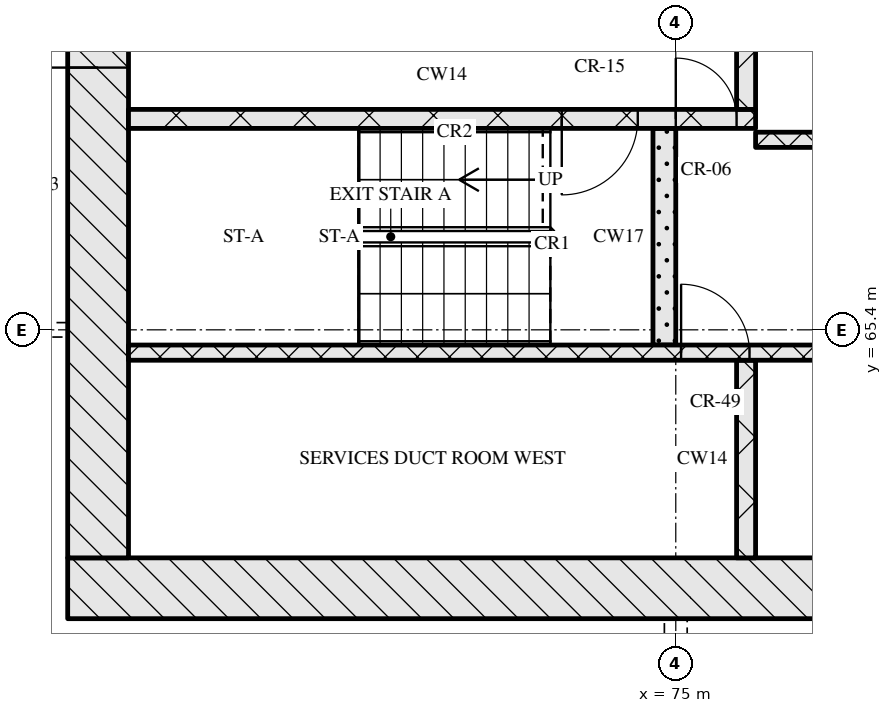
"""IFC4 building model, lengths in metres.
Left out: names, types, materials, properties, quantities, classifications, styles, units other than length and angle.
Written with IfcOpenShell. Run it as: python <this file> out.ifc"""

import sys

from ifc_helpers import new_model, si_unit, direction, frame, frame_2d, origin, place, context, subcontext, project, spatial, rectangle, extrude, element, fill, save


model = new_model("IFC4")
c1 = context("Model", 3, precision=1e-05, world=origin(), true_north=direction((0.0, 1.0)))
c2 = subcontext(c1, "Body", "Model", "MODEL_VIEW")
j1 = project(units=[si_unit("LENGTHUNIT", "METRE"), si_unit("PLANEANGLEUNIT", "RADIAN")], contexts=[c1])
p1 = place(None, origin())
s1 = spatial("IfcSite", under=j1, at=p1, CompositionType="ELEMENT")
p2 = place(p1, origin())
s2 = spatial("IfcBuilding", under=s1, at=p2, CompositionType="ELEMENT")
p3 = place(p2, frame((0.0, 0.0, 147.45)))
s3 = spatial("IfcBuildingStorey", under=s2, at=p3, CompositionType="ELEMENT", Elevation=147.45)
p4 = place(p3, frame((67.0, 62.0, 0.0), z_axis=(0.0, 0.0, 1.0), x_axis=(1.0, 0.0, 0.0)))
e1 = element("IfcWall", 1, at=p4, inside=s3, PredefinedType="SOLIDWALL", context=c2, shape_type="SweptSolid", body=[
    extrude(rectangle(XDim=41.2, YDim=0.8, at=frame_2d((20.6, 0.0))), origin(), (0.0, 0.0, 1.0), 3.32),
])
p5 = place(p4, frame((20.95, 0.0, 0.0)))
e2 = element("IfcOpeningElement", 2, at=p5, cuts=e1, PredefinedType="OPENING", context=c2, shape_type="SweptSolid", body=[
    extrude(rectangle(XDim=1.8, YDim=2.1, at=frame_2d((0.9, 1.05))), frame((0.0, 0.41, 0.0), z_axis=(0.0, -1.0, 0.0), x_axis=(1.0, 0.0, 0.0)), (0.0, 0.0, 1.0), 0.82),
])
p6 = place(p3, frame((67.4, 62.4, 0.0), z_axis=(0.0, 0.0, 1.0), x_axis=(0.0, 1.0, 0.0)))
e3 = element("IfcWall", 3, at=p6, inside=s3, PredefinedType="SOLIDWALL", context=c2, shape_type="SweptSolid", body=[
    extrude(rectangle(XDim=12.0, YDim=0.8, at=frame_2d((6.0, 0.0))), origin(), (0.0, 0.0, 1.0), 3.32),
])
p7 = place(p6, frame((6.45, 0.0, 0.0)))
e4 = element("IfcOpeningElement", 4, at=p7, cuts=e3, PredefinedType="OPENING", context=c2, shape_type="SweptSolid", body=[
    extrude(rectangle(XDim=1.2, YDim=2.1, at=frame_2d((0.6, 1.05))), frame((0.0, 0.41, 0.0), z_axis=(0.0, -1.0, 0.0), x_axis=(1.0, 0.0, 0.0)), (0.0, 0.0, 1.0), 0.82),
])
p8 = place(p3, frame((75.925, 62.4, 0.0), z_axis=(0.0, 0.0, 1.0), x_axis=(0.0, 1.0, 0.0)))
e5 = element("IfcWall", 5, at=p8, inside=s3, PredefinedType="SOLIDWALL", context=c2, shape_type="SweptSolid", body=[
    extrude(rectangle(XDim=2.6, YDim=0.25, at=frame_2d((1.3, 0.0))), origin(), (0.0, 0.0, 1.0), 3.32),
])
p9 = place(p3, frame((67.8, 65.1, 0.0), z_axis=(0.0, 0.0, 1.0), x_axis=(1.0, 0.0, 0.0)))
e6 = element("IfcWall", 6, at=p9, inside=s3, PredefinedType="SOLIDWALL", context=c2, shape_type="SweptSolid", body=[
    extrude(rectangle(XDim=18.5, YDim=0.2, at=frame_2d((9.25, 0.0))), origin(), (0.0, 0.0, 1.0), 3.32),
])
p10 = place(p9, frame((7.27, 0.0, 0.0)))
e7 = element("IfcOpeningElement", 7, at=p10, cuts=e6, PredefinedType="OPENING", context=c2, shape_type="SweptSolid", body=[
    extrude(rectangle(XDim=0.9, YDim=2.1, at=frame_2d((0.45, 1.05))), frame((0.0, 0.11, 0.0), z_axis=(0.0, -1.0, 0.0), x_axis=(1.0, 0.0, 0.0)), (0.0, 0.0, 1.0), 0.22),
])
p11 = place(p9, frame((11.45, 0.0, 0.0)))
e8 = element("IfcOpeningElement", 8, at=p11, cuts=e6, PredefinedType="OPENING", context=c2, shape_type="SweptSolid", body=[
    extrude(rectangle(XDim=0.9, YDim=2.1, at=frame_2d((0.45, 1.05))), frame((0.0, 0.11, 0.0), z_axis=(0.0, -1.0, 0.0), x_axis=(1.0, 0.0, 0.0)), (0.0, 0.0, 1.0), 0.22),
])
p12 = place(p9, frame((16.7, 0.0, 0.0)))
e9 = element("IfcOpeningElement", 9, at=p12, cuts=e6, PredefinedType="OPENING", context=c2, shape_type="SweptSolid", body=[
    extrude(rectangle(XDim=0.9, YDim=2.1, at=frame_2d((0.45, 1.05))), frame((0.0, 0.11, 0.0), z_axis=(0.0, -1.0, 0.0), x_axis=(1.0, 0.0, 0.0)), (0.0, 0.0, 1.0), 0.22),
])
p13 = place(p3, frame((74.85, 65.2, 0.0), z_axis=(0.0, 0.0, 1.0), x_axis=(0.0, 1.0, 0.0)))
e10 = element("IfcWall", 10, at=p13, inside=s3, PredefinedType="SOLIDWALL", context=c2, shape_type="SweptSolid", body=[
    extrude(rectangle(XDim=2.85, YDim=0.3, at=frame_2d((1.425, 0.0))), origin(), (0.0, 0.0, 1.0), 3.32),
])
p14 = place(p3, frame((76.05, 67.9, 0.0), z_axis=(0.0, 0.0, 1.0), x_axis=(1.0, 0.0, 0.0)))
e11 = element("IfcWall", 11, at=p14, inside=s3, PredefinedType="SOLIDWALL", context=c2, shape_type="SweptSolid", body=[
    extrude(rectangle(XDim=23.1, YDim=0.2, at=frame_2d((11.55, 0.0))), origin(), (0.0, 0.0, 1.0), 3.32),
])
p15 = place(p14, frame((1.4, 0.0, 0.0)))
e12 = element("IfcOpeningElement", 12, at=p15, cuts=e11, PredefinedType="OPENING", context=c2, shape_type="SweptSolid", body=[
    extrude(rectangle(XDim=0.9, YDim=2.1, at=frame_2d((0.45, 1.05))), frame((0.0, 0.11, 0.0), z_axis=(0.0, -1.0, 0.0), x_axis=(1.0, 0.0, 0.0)), (0.0, 0.0, 1.0), 0.22),
])
p16 = place(p14, frame((5.11, 0.0, 0.0)))
e13 = element("IfcOpeningElement", 13, at=p16, cuts=e11, PredefinedType="OPENING", context=c2, shape_type="SweptSolid", body=[
    extrude(rectangle(XDim=0.9, YDim=2.1, at=frame_2d((0.45, 1.05))), frame((0.0, 0.11, 0.0), z_axis=(0.0, -1.0, 0.0), x_axis=(1.0, 0.0, 0.0)), (0.0, 0.0, 1.0), 0.22),
])
p17 = place(p14, frame((8.45, 0.0, 0.0)))
e14 = element("IfcOpeningElement", 14, at=p17, cuts=e11, PredefinedType="OPENING", context=c2, shape_type="SweptSolid", body=[
    extrude(rectangle(XDim=0.9, YDim=2.1, at=frame_2d((0.45, 1.05))), frame((0.0, 0.11, 0.0), z_axis=(0.0, -1.0, 0.0), x_axis=(1.0, 0.0, 0.0)), (0.0, 0.0, 1.0), 0.22),
])
p18 = place(p14, frame((10.91, 0.0, 0.0)))
e15 = element("IfcOpeningElement", 15, at=p18, cuts=e11, PredefinedType="OPENING", context=c2, shape_type="SweptSolid", body=[
    extrude(rectangle(XDim=0.9, YDim=2.1, at=frame_2d((0.45, 1.05))), frame((0.0, 0.11, 0.0), z_axis=(0.0, -1.0, 0.0), x_axis=(1.0, 0.0, 0.0)), (0.0, 0.0, 1.0), 0.22),
])
p19 = place(p14, frame((13.55, 0.0, 0.0)))
e16 = element("IfcOpeningElement", 16, at=p19, cuts=e11, PredefinedType="OPENING", context=c2, shape_type="SweptSolid", body=[
    extrude(rectangle(XDim=1.0, YDim=2.1, at=frame_2d((0.5, 1.05))), frame((0.0, 0.11, 0.0), z_axis=(0.0, -1.0, 0.0), x_axis=(1.0, 0.0, 0.0)), (0.0, 0.0, 1.0), 0.22),
])
p20 = place(p14, frame((16.2, 0.0, 0.0)))
e17 = element("IfcOpeningElement", 17, at=p20, cuts=e11, PredefinedType="OPENING", context=c2, shape_type="SweptSolid", body=[
    extrude(rectangle(XDim=1.1, YDim=2.1, at=frame_2d((0.55, 1.05))), frame((0.0, 0.11, 0.0), z_axis=(0.0, -1.0, 0.0), x_axis=(1.0, 0.0, 0.0)), (0.0, 0.0, 1.0), 0.22),
])
p21 = place(p14, frame((18.7, 0.0, 0.0)))
e18 = element("IfcOpeningElement", 18, at=p21, cuts=e11, PredefinedType="OPENING", context=c2, shape_type="SweptSolid", body=[
    extrude(rectangle(XDim=1.1, YDim=2.1, at=frame_2d((0.55, 1.05))), frame((0.0, 0.11, 0.0), z_axis=(0.0, -1.0, 0.0), x_axis=(1.0, 0.0, 0.0)), (0.0, 0.0, 1.0), 0.22),
])
p22 = place(p14, frame((21.2, 0.0, 0.0)))
e19 = element("IfcOpeningElement", 19, at=p22, cuts=e11, PredefinedType="OPENING", context=c2, shape_type="SweptSolid", body=[
    extrude(rectangle(XDim=1.1, YDim=2.1, at=frame_2d((0.55, 1.05))), frame((0.0, 0.11, 0.0), z_axis=(0.0, -1.0, 0.0), x_axis=(1.0, 0.0, 0.0)), (0.0, 0.0, 1.0), 0.22),
])
p23 = place(p3, frame((67.8, 68.175, 0.0), z_axis=(0.0, 0.0, 1.0), x_axis=(1.0, 0.0, 0.0)))
e20 = element("IfcWall", 20, at=p23, inside=s3, PredefinedType="SOLIDWALL", context=c2, shape_type="SweptSolid", body=[
    extrude(rectangle(XDim=8.25, YDim=0.25, at=frame_2d((4.125, 0.0))), origin(), (0.0, 0.0, 1.0), 3.32),
])
p24 = place(p23, frame((5.7, 0.0, 0.0)))
e21 = element("IfcOpeningElement", 21, at=p24, cuts=e20, PredefinedType="OPENING", context=c2, shape_type="SweptSolid", body=[
    extrude(rectangle(XDim=1.0, YDim=2.1, at=frame_2d((0.5, 1.05))), frame((0.0, 0.135, 0.0), z_axis=(0.0, -1.0, 0.0), x_axis=(1.0, 0.0, 0.0)), (0.0, 0.0, 1.0), 0.27),
])
p25 = place(p23, frame((7.2, 0.0, 0.0)))
e22 = element("IfcOpeningElement", 22, at=p25, cuts=e20, PredefinedType="OPENING", context=c2, shape_type="SweptSolid", body=[
    extrude(rectangle(XDim=0.8, YDim=2.1, at=frame_2d((0.4, 1.05))), frame((0.0, 0.135, 0.0), z_axis=(0.0, -1.0, 0.0), x_axis=(1.0, 0.0, 0.0)), (0.0, 0.0, 1.0), 0.27),
])
p26 = place(p3, frame((75.925, 68.3, 0.0), z_axis=(0.0, 0.0, 1.0), x_axis=(0.0, 1.0, 0.0)))
e23 = element("IfcWall", 23, at=p26, inside=s3, PredefinedType="SOLIDWALL", context=c2, shape_type="SweptSolid", body=[
    extrude(rectangle(XDim=2.3, YDim=0.25, at=frame_2d((1.15, 0.0))), origin(), (0.0, 0.0, 1.0), 3.32),
])
p27 = place(p10, origin())
e24 = element("IfcDoor", 24, at=p27, inside=s3, OperationType="SINGLE_SWING_LEFT", PredefinedType="DOOR", context=c2, shape_type="SweptSolid", body=[
    extrude(rectangle(XDim=0.9, YDim=2.1, at=frame_2d((0.45, 1.05))), frame((0.0, 0.025, 0.0), z_axis=(0.0, -1.0, 0.0), x_axis=(1.0, 0.0, 0.0)), (0.0, 0.0, 1.0), 0.05),
])
fill(e7, e24)
p28 = place(p24, origin())
e25 = element("IfcDoor", 25, at=p28, inside=s3, OperationType="SINGLE_SWING_RIGHT", PredefinedType="DOOR", context=c2, shape_type="SweptSolid", body=[
    extrude(rectangle(XDim=1.0, YDim=2.1, at=frame_2d((0.5, 1.05))), frame((0.0, 0.025, 0.0), z_axis=(0.0, -1.0, 0.0), x_axis=(1.0, 0.0, 0.0)), (0.0, 0.0, 1.0), 0.05),
])
fill(e21, e25)
p29 = place(p25, origin())
e26 = element("IfcDoor", 26, at=p29, inside=s3, OperationType="SINGLE_SWING_LEFT", PredefinedType="DOOR", context=c2, shape_type="SweptSolid", body=[
    extrude(rectangle(XDim=0.8, YDim=2.1, at=frame_2d((0.4, 1.05))), frame((0.0, 0.025, 0.0), z_axis=(0.0, -1.0, 0.0), x_axis=(1.0, 0.0, 0.0)), (0.0, 0.0, 1.0), 0.05),
])
fill(e22, e26)
p30 = place(p7, origin())
e27 = element("IfcDoor", 27, at=p30, inside=s3, OperationType="SINGLE_SWING_LEFT", PredefinedType="DOOR", context=c2, shape_type="SweptSolid", body=[
    extrude(rectangle(XDim=1.2, YDim=2.1, at=frame_2d((0.6, 1.05))), frame((0.0, 0.025, 0.0), z_axis=(0.0, -1.0, 0.0), x_axis=(1.0, 0.0, 0.0)), (0.0, 0.0, 1.0), 0.05),
])
fill(e4, e27)
save(model, sys.argv[1])
